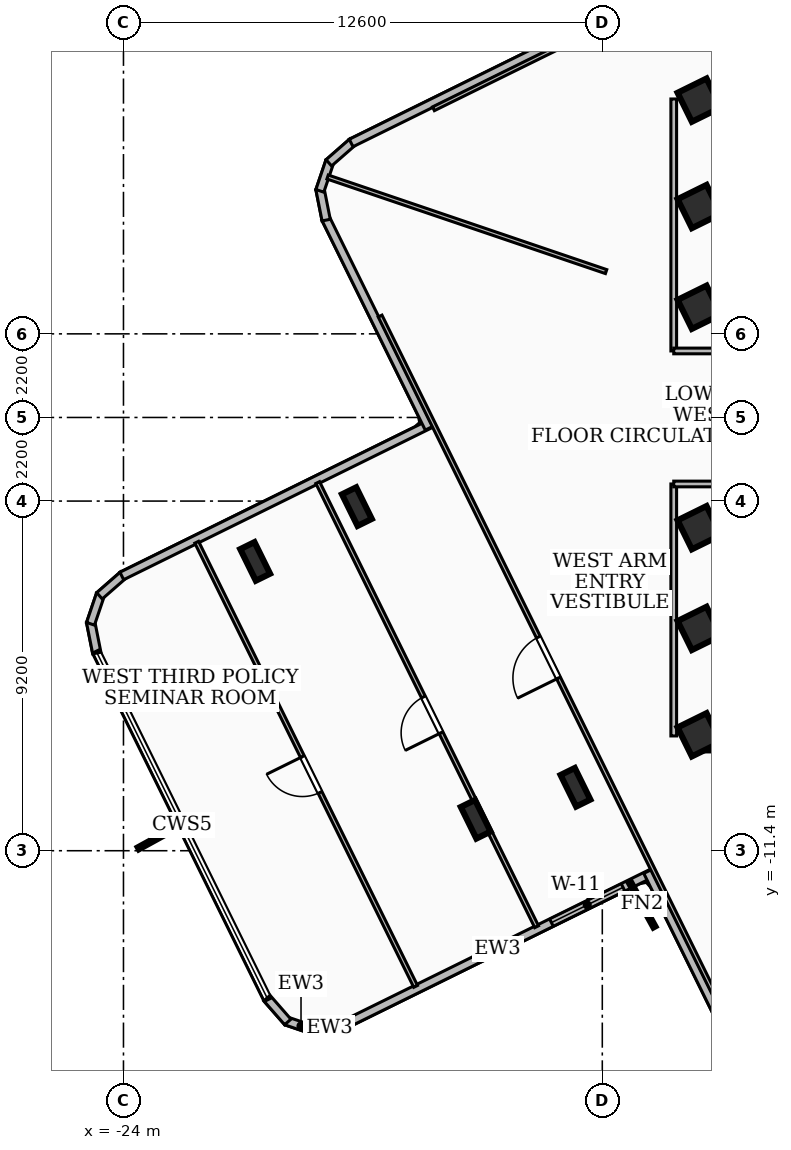
"""IFC4 building model, lengths in metres.
Left out: names, types, materials, properties, quantities, classifications, styles, units other than length and angle.
Written with IfcOpenShell. Run it as: python <this file> out.ifc"""

import sys

from ifc_helpers import new_model, si_unit, direction, frame, frame_2d, origin, origin_2d, place, context, subcontext, project, spatial, rectangle, i_section, extrude, element, fill, save


model = new_model("IFC4")
c1 = context("Model", 3, precision=1e-05, world=origin(), true_north=direction((0.0, 1.0)))
c2 = subcontext(c1, "Body", "Model", "MODEL_VIEW")
j1 = project(units=[si_unit("LENGTHUNIT", "METRE"), si_unit("PLANEANGLEUNIT", "RADIAN")], contexts=[c1])
p1 = place(None, origin())
s1 = spatial("IfcSite", under=j1, at=p1, CompositionType="ELEMENT")
p2 = place(p1, origin())
s2 = spatial("IfcBuilding", under=s1, at=p2, CompositionType="ELEMENT")
p3 = place(p2, frame((0.0, 0.0, 192.6)))
s3 = spatial("IfcBuildingStorey", under=s2, at=p3, CompositionType="ELEMENT", Elevation=192.6)
for number, where, z_axis, x_axis in (
    (1, (-8.78, 8.535, 0.0), (0.0, 0.0, 1.0), (1.0, 0.0, 0.0)),
    (2, (8.78, -8.535, 0.0), (0.0, 0.0, 1.0), (-1.0, 0.0, 0.0)),
):
    element("IfcWall", number, at=place(p3, frame(where, z_axis=z_axis, x_axis=x_axis)), inside=s3, PredefinedType="SHEAR", context=c2, shape_type="SweptSolid", body=[
        extrude(rectangle(XDim=17.56, YDim=0.45, at=frame_2d((8.78, 0.0))), origin(), (0.0, 0.0, 1.0), 3.2),
    ])
for number, where, z_axis, x_axis in (
    (3, (-8.85, -5.55, 0.0), (0.0, 0.0, 1.0), (0.897, 0.442, 0.0)),
    (4, (-8.85, -2.9, 0.0), (0.0, 0.0, 1.0), (0.897, 0.442, 0.0)),
    (5, (-8.85, 2.9, 0.0), (0.0, 0.0, 1.0), (0.897, 0.442, 0.0)),
    (6, (-8.85, 5.55, 0.0), (0.0, 0.0, 1.0), (0.897, 0.442, 0.0)),
    (7, (-8.85, 8.35, 0.0), (0.0, 0.0, 1.0), (0.897, 0.442, 0.0)),
    (8, (-8.85, -8.35, 0.0), (0.0, 0.0, 1.0), (0.897, 0.442, 0.0)),
):
    element("IfcColumn", number, at=place(p3, frame(where, z_axis=z_axis, x_axis=x_axis)), inside=s3, PredefinedType="COLUMN", context=c2, shape_type="SweptSolid", body=[
        extrude(rectangle(XDim=0.85, YDim=0.85, at=origin_2d()), origin(), (0.0, 0.0, 1.0), 3.6),
    ])
for number, where, z_axis, x_axis in (
    (9, (-17.858, -2.346, 0.0), (0.0, 0.0, 1.0), (0.897, 0.442, 0.0)),
    (10, (-12.106, -9.731, 0.0), (0.0, 0.0, 1.0), (0.897, 0.442, 0.0)),
    (11, (-20.535, -3.788, 0.0), (0.0, 0.0, 1.0), (0.897, 0.442, 0.0)),
    (12, (-14.731, -10.573, 0.0), (0.0, 0.0, 1.0), (0.897, 0.442, 0.0)),
):
    element("IfcColumn", number, at=place(p3, frame(where, z_axis=z_axis, x_axis=x_axis)), inside=s3, PredefinedType="COLUMN", context=c2, shape_type="SweptSolid", body=[
        extrude(i_section(OverallWidth=0.418, OverallDepth=0.927, WebThickness=0.019, FlangeThickness=0.032, at=origin_2d()), origin(), (0.0, 0.0, 1.0), 3.6),
    ])
p4 = place(p3, frame((-10.092, -11.988, 0.0), z_axis=(0.0, 0.0, 1.0), x_axis=(-0.89699971925, -0.442031111649, 0.0)))
e13 = element("IfcWall", 13, at=p4, inside=s3, PredefinedType="SOLIDWALL", context=c2, shape_type="SweptSolid", body=[
    extrude(rectangle(XDim=9.058, YDim=0.22, at=frame_2d((4.529, 0.0))), origin(), (0.0, 0.0, 1.0), 3.2),
])
p5 = place(p4, frame((0.85, 0.0, 0.85)))
e14 = element("IfcOpeningElement", 14, at=p5, cuts=e13, PredefinedType="OPENING", context=c2, shape_type="SweptSolid", body=[
    extrude(rectangle(XDim=2.1, YDim=1.6, at=frame_2d((1.05, 0.8))), frame((0.0, 0.12, 0.0), z_axis=(0.0, -1.0, 0.0), x_axis=(1.0, 0.0, 0.0)), (0.0, 0.0, 1.0), 0.24),
])
p6 = place(p3, frame((-18.17, -15.976, 0.0), z_axis=(0.0, 0.0, 1.0), x_axis=(-0.980804908934, -0.194991616769, 0.0)))
e15 = element("IfcWall", 15, at=p6, inside=s3, PredefinedType="SOLIDWALL", context=c2, shape_type="SweptSolid", body=[
    extrude(rectangle(XDim=0.835, YDim=0.22, at=frame_2d((0.417, 0.0))), origin(), (0.0, 0.0, 1.0), 3.2),
])
p7 = place(p3, frame((-18.94, -16.142, 0.0), z_axis=(0.0, 0.0, 1.0), x_axis=(-0.94703210012, 0.321138912843, 0.0)))
e16 = element("IfcWall", 16, at=p7, inside=s3, PredefinedType="SOLIDWALL", context=c2, shape_type="SweptSolid", body=[
    extrude(rectangle(XDim=0.82, YDim=0.22, at=frame_2d((0.41, 0.0))), origin(), (0.0, 0.0, 1.0), 3.2),
])
p8 = place(p3, frame((-19.676, -15.906, 0.0), z_axis=(0.0, 0.0, 1.0), x_axis=(-0.658255916404, 0.752794227209, 0.0)))
e17 = element("IfcWall", 17, at=p8, inside=s3, PredefinedType="SOLIDWALL", context=c2, shape_type="SweptSolid", body=[
    extrude(rectangle(XDim=0.834, YDim=0.22, at=frame_2d((0.417, 0.0))), origin(), (0.0, 0.0, 1.0), 3.2),
])
p9 = place(p3, frame((-24.701, -6.199, 0.0), z_axis=(0.0, 0.0, 1.0), x_axis=(-0.195272818647, 0.980748961915, 0.0)))
e18 = element("IfcWall", 18, at=p9, inside=s3, PredefinedType="SOLIDWALL", context=c2, shape_type="SweptSolid", body=[
    extrude(rectangle(XDim=0.835, YDim=0.22, at=frame_2d((0.417, 0.0))), origin(), (0.0, 0.0, 1.0), 3.2),
])
p10 = place(p3, frame((-24.867, -5.429, 0.0), z_axis=(0.0, 0.0, 1.0), x_axis=(0.320962261507, 0.94709198428, 0.0)))
e19 = element("IfcWall", 19, at=p10, inside=s3, PredefinedType="SOLIDWALL", context=c2, shape_type="SweptSolid", body=[
    extrude(rectangle(XDim=0.819, YDim=0.22, at=frame_2d((0.41, 0.0))), origin(), (0.0, 0.0, 1.0), 3.2),
])
p11 = place(p3, frame((-24.631, -4.693, 0.0), z_axis=(0.0, 0.0, 1.0), x_axis=(0.75292100738, 0.65811089996, 0.0)))
e20 = element("IfcWall", 20, at=p11, inside=s3, PredefinedType="SOLIDWALL", context=c2, shape_type="SweptSolid", body=[
    extrude(rectangle(XDim=0.834, YDim=0.22, at=frame_2d((0.417, 0.0))), origin(), (0.0, 0.0, 1.0), 3.2),
])
p12 = place(p3, frame((-24.044, -4.171, 0.0), z_axis=(0.0, 0.0, 1.0), x_axis=(0.896935893297, 0.442160608055, 0.0)))
e21 = element("IfcWall", 21, at=p12, inside=s3, PredefinedType="SOLIDWALL", context=c2, shape_type="SweptSolid", body=[
    extrude(rectangle(XDim=9.058, YDim=0.22, at=frame_2d((4.529, 0.0))), origin(), (0.0, 0.0, 1.0), 3.2),
])
p13 = place(p3, frame((-15.96, -0.284, 0.0), z_axis=(0.0, 0.0, 1.0), x_axis=(-0.442004580174, 0.897012793167, 0.0)))
e22 = element("IfcWall", 22, at=p13, inside=s3, PredefinedType="SOLIDWALL", context=c2, shape_type="SweptSolid", body=[
    extrude(rectangle(XDim=6.158, YDim=0.22, at=frame_2d((3.079, 0.0))), origin(), (0.0, 0.0, 1.0), 3.2),
])
p14 = place(p3, frame((-18.666, 5.193, 0.0), z_axis=(0.0, 0.0, 1.0), x_axis=(-0.19532881852, 0.980737810353, 0.0)))
e23 = element("IfcWall", 23, at=p14, inside=s3, PredefinedType="SOLIDWALL", context=c2, shape_type="SweptSolid", body=[
    extrude(rectangle(XDim=0.835, YDim=0.22, at=frame_2d((0.417, 0.0))), origin(), (0.0, 0.0, 1.0), 3.2),
])
p15 = place(p3, frame((-18.832, 5.963, 0.0), z_axis=(0.0, 0.0, 1.0), x_axis=(0.320509908962, 0.947245162699, 0.0)))
e24 = element("IfcWall", 24, at=p15, inside=s3, PredefinedType="SOLIDWALL", context=c2, shape_type="SweptSolid", body=[
    extrude(rectangle(XDim=0.82, YDim=0.22, at=frame_2d((0.41, 0.0))), origin(), (0.0, 0.0, 1.0), 3.2),
])
p16 = place(p3, frame((-18.596, 6.7, 0.0), z_axis=(0.0, 0.0, 1.0), x_axis=(0.752794227209, 0.658255916404, 0.0)))
e25 = element("IfcWall", 25, at=p16, inside=s3, PredefinedType="SOLIDWALL", context=c2, shape_type="SweptSolid", body=[
    extrude(rectangle(XDim=0.834, YDim=0.22, at=frame_2d((0.417, 0.0))), origin(), (0.0, 0.0, 1.0), 3.2),
])
for number, where, z_axis, x_axis in (
    (26, (-18.009, 7.222, 0.0), (0.0, 0.0, 1.0), (0.897, 0.442, 0.0)),
    (27, (-7.222, -18.009, 0.0), (0.0, 0.0, 1.0), (-0.442, 0.897, 0.0)),
):
    element("IfcWall", number, at=place(p3, frame(where, z_axis=z_axis, x_axis=x_axis)), inside=s3, PredefinedType="SOLIDWALL", context=c2, shape_type="SweptSolid", body=[
        extrude(rectangle(XDim=6.758, YDim=0.22, at=frame_2d((3.379, 0.0))), origin(), (0.0, 0.0, 1.0), 3.2),
    ])
p17 = place(p3, frame((-9.52, 1.75, 0.0), z_axis=(0.0, 0.0, 1.0), x_axis=(0.0, 1.0, 0.0)))
e28 = element("IfcWall", 28, at=p17, inside=s3, PredefinedType="PARTITIONING", context=c2, shape_type="SweptSolid", body=[
    extrude(rectangle(XDim=6.63, YDim=0.15, at=frame_2d((3.315, 0.0))), origin(), (0.0, 0.0, 1.0), 3.2),
])
p18 = place(p3, frame((-7.85, 1.75, 0.0), z_axis=(0.0, 0.0, 1.0), x_axis=(-1.0, 0.0, 0.0)))
e29 = element("IfcWall", 29, at=p18, inside=s3, PredefinedType="PARTITIONING", context=c2, shape_type="SweptSolid", body=[
    extrude(rectangle(XDim=1.67, YDim=0.15, at=frame_2d((0.835, 0.0))), origin(), (0.0, 0.0, 1.0), 2.43),
])
p19 = place(p3, frame((-9.52, -8.38, 0.0), z_axis=(0.0, 0.0, 1.0), x_axis=(0.0, 1.0, 0.0)))
e30 = element("IfcWall", 30, at=p19, inside=s3, PredefinedType="PARTITIONING", context=c2, shape_type="SweptSolid", body=[
    extrude(rectangle(XDim=6.63, YDim=0.15, at=frame_2d((3.315, 0.0))), origin(), (0.0, 0.0, 1.0), 2.504),
])
p20 = place(p3, frame((-7.85, -1.75, 0.0), z_axis=(0.0, 0.0, 1.0), x_axis=(-1.0, 0.0, 0.0)))
e31 = element("IfcWall", 31, at=p20, inside=s3, PredefinedType="PARTITIONING", context=c2, shape_type="SweptSolid", body=[
    extrude(rectangle(XDim=1.67, YDim=0.15, at=frame_2d((0.835, 0.0))), origin(), (0.0, 0.0, 1.0), 2.43),
])
p21 = place(p3, frame((-11.3, 3.838, 0.0), z_axis=(0.0, 0.0, 1.0), x_axis=(-0.946882857271, 0.321578691158, 0.0)))
e32 = element("IfcWall", 32, at=p21, inside=s3, PredefinedType="PARTITIONING", context=c2, shape_type="SweptSolid", body=[
    extrude(rectangle(XDim=7.74, YDim=0.11, at=frame_2d((3.87, 0.0))), origin(), (0.0, 0.0, 1.0), 3.2),
])
p22 = place(p3, frame((-15.843, 8.122, 0.0), z_axis=(0.0, 0.0, 1.0), x_axis=(0.896951333774, 0.442129285211, 0.0)))
e33 = element("IfcWall", 33, at=p22, inside=s3, PredefinedType="PARTITIONING", context=c2, shape_type="SweptSolid", body=[
    extrude(rectangle(XDim=20.639, YDim=0.11, at=frame_2d((10.319, 0.0))), origin(), (0.0, 0.0, 1.0), 2.504),
])
p23 = place(p22, frame((10.02, 0.0, 0.0)))
e34 = element("IfcOpeningElement", 34, at=p23, cuts=e33, PredefinedType="OPENING", context=c2, shape_type="SweptSolid", body=[
    extrude(rectangle(XDim=1.2, YDim=2.1, at=frame_2d((0.6, 1.05))), frame((0.0, 0.065, 0.0), z_axis=(0.0, -1.0, 0.0), x_axis=(1.0, 0.0, 0.0)), (0.0, 0.0, 1.0), 0.13),
])
p24 = place(p3, frame((-8.122, -15.843, 0.0), z_axis=(0.0, 0.0, 1.0), x_axis=(-0.442129285211, 0.896951333774, 0.0)))
e35 = element("IfcWall", 35, at=p24, inside=s3, PredefinedType="PARTITIONING", context=c2, shape_type="SweptSolid", body=[
    extrude(rectangle(XDim=20.639, YDim=0.11, at=frame_2d((10.319, 0.0))), origin(), (0.0, 0.0, 1.0), 2.504),
])
p25 = place(p24, frame((10.02, 0.0, 0.0)))
e36 = element("IfcOpeningElement", 36, at=p25, cuts=e35, PredefinedType="OPENING", context=c2, shape_type="SweptSolid", body=[
    extrude(rectangle(XDim=1.2, YDim=2.1, at=frame_2d((0.6, 1.05))), frame((0.0, 0.065, 0.0), z_axis=(0.0, -1.0, 0.0), x_axis=(1.0, 0.0, 0.0)), (0.0, 0.0, 1.0), 0.13),
])
p26 = place(p3, frame((-13.128, -13.4, 0.0), z_axis=(0.0, 0.0, 1.0), x_axis=(-0.442139902385, 0.896946100231, 0.0)))
e37 = element("IfcWall", 37, at=p26, inside=s3, PredefinedType="PARTITIONING", context=c2, shape_type="SweptSolid", body=[
    extrude(rectangle(XDim=13.03, YDim=0.11, at=frame_2d((6.515, 0.0))), origin(), (0.0, 0.0, 1.0), 2.504),
])
p27 = place(p26, frame((5.69, 0.0, 0.0)))
e38 = element("IfcOpeningElement", 38, at=p27, cuts=e37, PredefinedType="OPENING", context=c2, shape_type="SweptSolid", body=[
    extrude(rectangle(XDim=1.05, YDim=2.08, at=frame_2d((0.525, 1.04))), frame((0.0, 0.065, 0.0), z_axis=(0.0, -1.0, 0.0), x_axis=(1.0, 0.0, 0.0)), (0.0, 0.0, 1.0), 0.13),
])
p28 = place(p3, frame((-16.312, -14.97, 0.0), z_axis=(0.0, 0.0, 1.0), x_axis=(-0.442139902385, 0.896946100231, 0.0)))
e39 = element("IfcWall", 39, at=p28, inside=s3, PredefinedType="PARTITIONING", context=c2, shape_type="SweptSolid", body=[
    extrude(rectangle(XDim=13.03, YDim=0.11, at=frame_2d((6.515, 0.0))), origin(), (0.0, 0.0, 1.0), 3.2),
])
p29 = place(p28, frame((5.69, 0.0, 0.0)))
e40 = element("IfcOpeningElement", 40, at=p29, cuts=e39, PredefinedType="OPENING", context=c2, shape_type="SweptSolid", body=[
    extrude(rectangle(XDim=1.05, YDim=2.08, at=frame_2d((0.525, 1.04))), frame((0.0, 0.065, 0.0), z_axis=(0.0, -1.0, 0.0), x_axis=(1.0, 0.0, 0.0)), (0.0, 0.0, 1.0), 0.13),
])
p30 = place(p5, origin())
e41 = element("IfcWindow", 41, at=p30, inside=s3, PartitioningType="SINGLE_PANEL", PredefinedType="WINDOW", context=c2, shape_type="SweptSolid", body=[
    extrude(rectangle(XDim=2.1, YDim=1.6, at=frame_2d((1.05, 0.8))), frame((0.0, 0.03, 0.0), z_axis=(0.0, -1.0, 0.0), x_axis=(1.0, 0.0, 0.0)), (0.0, 0.0, 1.0), 0.06),
])
fill(e14, e41)
p31 = place(p25, origin())
e42 = element("IfcDoor", 42, at=p31, inside=s3, OperationType="SINGLE_SWING_LEFT", PredefinedType="DOOR", context=c2, shape_type="SweptSolid", body=[
    extrude(rectangle(XDim=1.2, YDim=2.1, at=frame_2d((0.6, 1.05))), frame((0.0, 0.025, 0.0), z_axis=(0.0, -1.0, 0.0), x_axis=(1.0, 0.0, 0.0)), (0.0, 0.0, 1.0), 0.05),
])
fill(e36, e42)
p32 = place(p27, origin())
e43 = element("IfcDoor", 43, at=p32, inside=s3, OperationType="SINGLE_SWING_LEFT", PredefinedType="DOOR", context=c2, shape_type="SweptSolid", body=[
    extrude(rectangle(XDim=1.05, YDim=2.08, at=frame_2d((0.525, 1.04))), frame((0.0, 0.025, 0.0), z_axis=(0.0, -1.0, 0.0), x_axis=(1.0, 0.0, 0.0)), (0.0, 0.0, 1.0), 0.05),
])
fill(e38, e43)
p33 = place(p29, origin())
e44 = element("IfcDoor", 44, at=p33, inside=s3, OperationType="SINGLE_SWING_RIGHT", PredefinedType="DOOR", context=c2, shape_type="SweptSolid", body=[
    extrude(rectangle(XDim=1.05, YDim=2.08, at=frame_2d((0.525, 1.04))), frame((0.0, 0.025, 0.0), z_axis=(0.0, -1.0, 0.0), x_axis=(1.0, 0.0, 0.0)), (0.0, 0.0, 1.0), 0.05),
])
fill(e40, e44)
save(model, sys.argv[1])
